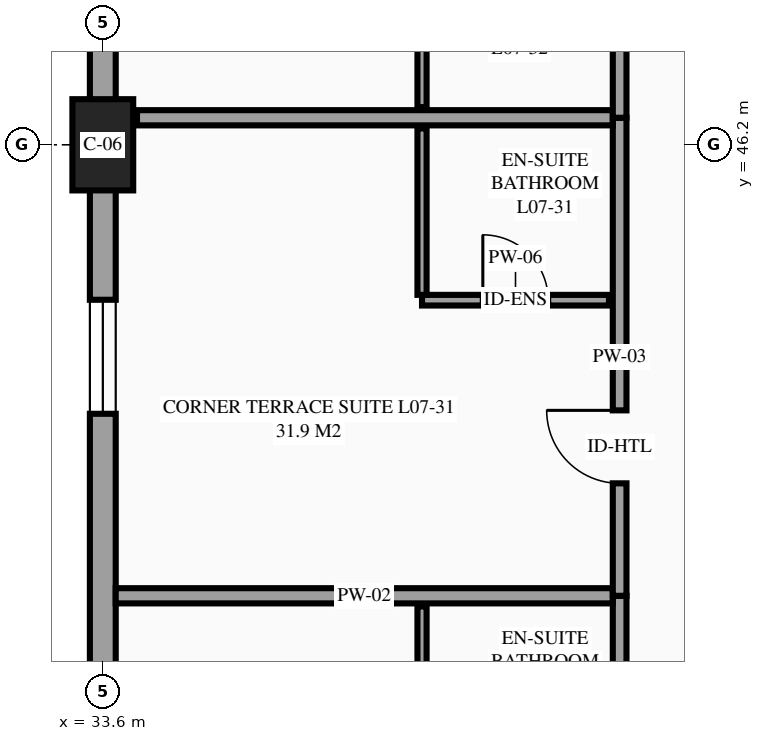
"""IFC4 building model, lengths in metres.
Left out: names, types, materials, properties, quantities, classifications, styles, units other than length and angle.
Written with IfcOpenShell. Run it as: python <this file> out.ifc"""

import sys

from ifc_helpers import new_model, si_unit, direction, frame, frame_2d, origin, origin_2d, place, context, subcontext, project, spatial, rectangle, extrude, element, fill, save


model = new_model("IFC4")
c1 = context("Model", 3, precision=1e-05, world=origin(), true_north=direction((0.0, 1.0)))
c2 = subcontext(c1, "Body", "Model", "MODEL_VIEW")
j1 = project(units=[si_unit("LENGTHUNIT", "METRE"), si_unit("PLANEANGLEUNIT", "RADIAN")], contexts=[c1])
p1 = place(None, origin())
s1 = spatial("IfcSite", under=j1, at=p1, CompositionType="ELEMENT")
p2 = place(p1, origin())
s2 = spatial("IfcBuilding", under=s1, at=p2, CompositionType="ELEMENT")
p3 = place(p2, frame((0.0, 0.0, 29.1)))
s3 = spatial("IfcBuildingStorey", under=s2, at=p3, CompositionType="ELEMENT", Elevation=29.1)
p4 = place(p3, frame((33.6, 46.2, 0.0), z_axis=(0.0, 0.0, 1.0), x_axis=(1.0, 0.0, 0.0)))
e1 = element("IfcColumn", 1, at=p4, inside=s3, PredefinedType="COLUMN", context=c2, shape_type="SweptSolid", body=[
    extrude(rectangle(XDim=0.8, YDim=1.2, at=origin_2d()), origin(), (0.0, 0.0, 1.0), 3.6),
])
p5 = place(p3, frame((33.6, 54.6, 0.0), z_axis=(0.0, 0.0, 1.0), x_axis=(0.0, -1.0, 0.0)))
e2 = element("IfcWall", 2, at=p5, inside=s3, PredefinedType="STANDARD", context=c2, shape_type="SweptSolid", body=[
    extrude(rectangle(XDim=25.2, YDim=0.34, at=frame_2d((12.6, 0.0))), origin(), (0.0, 0.0, 1.0), 2.48),
])
p6 = place(p5, frame((23.017, 0.0, 0.85)))
e3 = element("IfcOpeningElement", 3, at=p6, cuts=e2, PredefinedType="OPENING", context=c2, shape_type="SweptSolid", body=[
    extrude(rectangle(XDim=1.5, YDim=1.5, at=frame_2d((0.75, 0.75))), frame((0.0, 0.18, 0.0), z_axis=(0.0, -1.0, 0.0), x_axis=(1.0, 0.0, 0.0)), (0.0, 0.0, 1.0), 0.36),
])
p7 = place(p5, frame((17.478, 0.0, 0.85)))
e4 = element("IfcOpeningElement", 4, at=p7, cuts=e2, PredefinedType="OPENING", context=c2, shape_type="SweptSolid", body=[
    extrude(rectangle(XDim=1.5, YDim=1.5, at=frame_2d((0.75, 0.75))), frame((0.0, 0.18, 0.0), z_axis=(0.0, -1.0, 0.0), x_axis=(1.0, 0.0, 0.0)), (0.0, 0.0, 1.0), 0.36),
])
p8 = place(p5, frame((10.439, 0.0, 0.85)))
e5 = element("IfcOpeningElement", 5, at=p8, cuts=e2, PredefinedType="OPENING", context=c2, shape_type="SweptSolid", body=[
    extrude(rectangle(XDim=1.5, YDim=1.5, at=frame_2d((0.75, 0.75))), frame((0.0, 0.18, 0.0), z_axis=(0.0, -1.0, 0.0), x_axis=(1.0, 0.0, 0.0)), (0.0, 0.0, 1.0), 0.36),
])
p9 = place(p5, frame((4.15, 0.0, 0.85)))
e6 = element("IfcOpeningElement", 6, at=p9, cuts=e2, PredefinedType="OPENING", context=c2, shape_type="SweptSolid", body=[
    extrude(rectangle(XDim=1.5, YDim=1.5, at=frame_2d((0.75, 0.75))), frame((0.0, 0.18, 0.0), z_axis=(0.0, -1.0, 0.0), x_axis=(1.0, 0.0, 0.0)), (0.0, 0.0, 1.0), 0.36),
])
p10 = place(p3, frame((40.4, 33.978, 0.0), z_axis=(0.0, 0.0, 1.0), x_axis=(0.0, 1.0, 0.0)))
e7 = element("IfcWall", 7, at=p10, inside=s3, PredefinedType="PARTITIONING", context=c2, shape_type="SweptSolid", body=[
    extrude(rectangle(XDim=6.289, YDim=0.18, at=frame_2d((3.145, 0.0))), origin(), (0.0, 0.0, 1.0), 3.375),
])
p11 = place(p10, frame((1.479, 0.0, 0.0)))
e8 = element("IfcOpeningElement", 8, at=p11, cuts=e7, PredefinedType="OPENING", context=c2, shape_type="SweptSolid", body=[
    extrude(rectangle(XDim=0.96, YDim=2.15, at=frame_2d((0.48, 1.075))), frame((0.0, 0.1, 0.0), z_axis=(0.0, -1.0, 0.0), x_axis=(1.0, 0.0, 0.0)), (0.0, 0.0, 1.0), 0.2),
])
p12 = place(p3, frame((33.77, 40.267, 0.0), z_axis=(0.0, 0.0, 1.0), x_axis=(1.0, 0.0, 0.0)))
e9 = element("IfcWall", 9, at=p12, inside=s3, PredefinedType="PARTITIONING", context=c2, shape_type="SweptSolid", body=[
    extrude(rectangle(XDim=6.54, YDim=0.2, at=frame_2d((3.27, 0.0))), origin(), (0.0, 0.0, 1.0), 3.375),
])
p13 = place(p3, frame((37.8, 37.937, 0.0), z_axis=(0.0, 0.0, 1.0), x_axis=(0.0, 1.0, 0.0)))
e10 = element("IfcWall", 10, at=p13, inside=s3, PredefinedType="PARTITIONING", context=c2, shape_type="SweptSolid", body=[
    extrude(rectangle(XDim=2.19, YDim=0.12, at=frame_2d((1.095, 0.0))), origin(), (0.0, 0.0, 1.0), 3.375),
])
p14 = place(p3, frame((40.4, 40.267, 0.0), z_axis=(0.0, 0.0, 1.0), x_axis=(0.0, 1.0, 0.0)))
e11 = element("IfcWall", 11, at=p14, inside=s3, PredefinedType="PARTITIONING", context=c2, shape_type="SweptSolid", body=[
    extrude(rectangle(XDim=6.289, YDim=0.18, at=frame_2d((3.145, 0.0))), origin(), (0.0, 0.0, 1.0), 3.375),
])
p15 = place(p14, frame((1.479, 0.0, 0.0)))
e12 = element("IfcOpeningElement", 12, at=p15, cuts=e11, PredefinedType="OPENING", context=c2, shape_type="SweptSolid", body=[
    extrude(rectangle(XDim=0.96, YDim=2.15, at=frame_2d((0.48, 1.075))), frame((0.0, 0.1, 0.0), z_axis=(0.0, -1.0, 0.0), x_axis=(1.0, 0.0, 0.0)), (0.0, 0.0, 1.0), 0.2),
])
p16 = place(p3, frame((34.05, 46.556, 0.0), z_axis=(0.0, 0.0, 1.0), x_axis=(1.0, 0.0, 0.0)))
e13 = element("IfcWall", 13, at=p16, inside=s3, PredefinedType="PARTITIONING", context=c2, shape_type="SweptSolid", body=[
    extrude(rectangle(XDim=6.26, YDim=0.2, at=frame_2d((3.13, 0.0))), origin(), (0.0, 0.0, 1.0), 3.375),
])
p17 = place(p3, frame((37.8, 44.156, 0.0), z_axis=(0.0, 0.0, 1.0), x_axis=(1.0, 0.0, 0.0)))
e14 = element("IfcWall", 14, at=p17, inside=s3, PredefinedType="PARTITIONING", context=c2, shape_type="SweptSolid", body=[
    extrude(rectangle(XDim=2.46, YDim=0.14, at=frame_2d((1.23, 0.0))), origin(), (0.0, 0.0, 1.0), 3.375),
])
p18 = place(p17, frame((0.8, 0.0, 0.0)))
e15 = element("IfcOpeningElement", 15, at=p18, cuts=e14, PredefinedType="OPENING", context=c2, shape_type="SweptSolid", body=[
    extrude(rectangle(XDim=0.86, YDim=2.1, at=frame_2d((0.43, 1.05))), frame((0.0, 0.08, 0.0), z_axis=(0.0, -1.0, 0.0), x_axis=(1.0, 0.0, 0.0)), (0.0, 0.0, 1.0), 0.16),
])
p19 = place(p3, frame((37.8, 44.226, 0.0), z_axis=(0.0, 0.0, 1.0), x_axis=(0.0, 1.0, 0.0)))
e16 = element("IfcWall", 16, at=p19, inside=s3, PredefinedType="PARTITIONING", context=c2, shape_type="SweptSolid", body=[
    extrude(rectangle(XDim=2.19, YDim=0.12, at=frame_2d((1.095, 0.0))), origin(), (0.0, 0.0, 1.0), 3.375),
])
p20 = place(p3, frame((40.4, 46.556, 0.0), z_axis=(0.0, 0.0, 1.0), x_axis=(0.0, 1.0, 0.0)))
e17 = element("IfcWall", 17, at=p20, inside=s3, PredefinedType="PARTITIONING", context=c2, shape_type="SweptSolid", body=[
    extrude(rectangle(XDim=6.289, YDim=0.18, at=frame_2d((3.145, 0.0))), origin(), (0.0, 0.0, 1.0), 3.375),
])
p21 = place(p20, frame((3.849, 0.0, 0.0)))
e18 = element("IfcOpeningElement", 18, at=p21, cuts=e17, PredefinedType="OPENING", context=c2, shape_type="SweptSolid", body=[
    extrude(rectangle(XDim=0.96, YDim=2.15, at=frame_2d((0.48, 1.075))), frame((0.0, 0.1, 0.0), z_axis=(0.0, -1.0, 0.0), x_axis=(1.0, 0.0, 0.0)), (0.0, 0.0, 1.0), 0.2),
])
p22 = place(p3, frame((37.8, 46.696, 0.0), z_axis=(0.0, 0.0, 1.0), x_axis=(0.0, 1.0, 0.0)))
e19 = element("IfcWall", 19, at=p22, inside=s3, PredefinedType="PARTITIONING", context=c2, shape_type="SweptSolid", body=[
    extrude(rectangle(XDim=2.19, YDim=0.12, at=frame_2d((1.095, 0.0))), origin(), (0.0, 0.0, 1.0), 3.375),
])
p23 = place(p8, origin())
e20 = element("IfcWindow", 20, at=p23, inside=s3, PartitioningType="SINGLE_PANEL", PredefinedType="WINDOW", context=c2, shape_type="SweptSolid", body=[
    extrude(rectangle(XDim=1.5, YDim=1.5, at=frame_2d((0.75, 0.75))), frame((0.0, 0.03, 0.0), z_axis=(0.0, -1.0, 0.0), x_axis=(1.0, 0.0, 0.0)), (0.0, 0.0, 1.0), 0.06),
])
fill(e5, e20)
p24 = place(p15, origin())
e21 = element("IfcDoor", 21, at=p24, inside=s3, OperationType="SINGLE_SWING_RIGHT", PredefinedType="DOOR", context=c2, shape_type="SweptSolid", body=[
    extrude(rectangle(XDim=0.96, YDim=2.15, at=frame_2d((0.48, 1.075))), frame((0.0, 0.025, 0.0), z_axis=(0.0, -1.0, 0.0), x_axis=(1.0, 0.0, 0.0)), (0.0, 0.0, 1.0), 0.05),
])
fill(e12, e21)
p25 = place(p18, origin())
e22 = element("IfcDoor", 22, at=p25, inside=s3, OperationType="SINGLE_SWING_LEFT", PredefinedType="DOOR", context=c2, shape_type="SweptSolid", body=[
    extrude(rectangle(XDim=0.86, YDim=2.1, at=frame_2d((0.43, 1.05))), frame((0.0, 0.025, 0.0), z_axis=(0.0, -1.0, 0.0), x_axis=(1.0, 0.0, 0.0)), (0.0, 0.0, 1.0), 0.05),
])
fill(e15, e22)
save(model, sys.argv[1])
